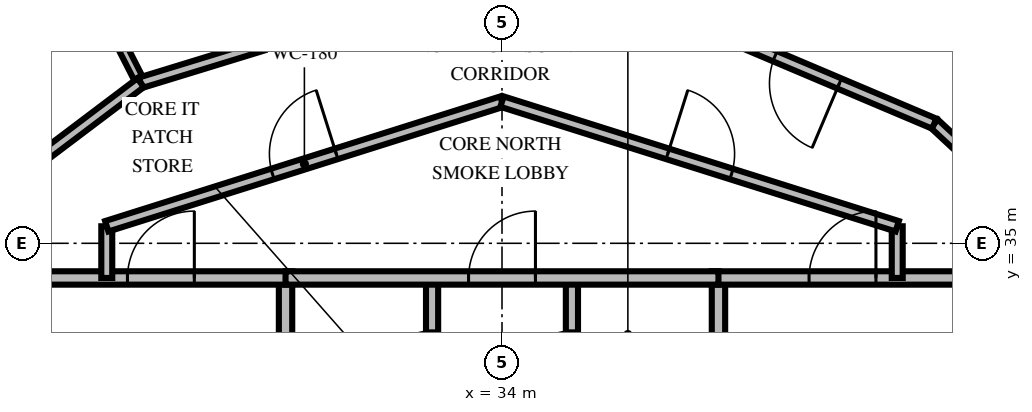
"""IFC4 building model, lengths in metres.
Left out: names, types, materials, properties, quantities, classifications, styles, units other than length and angle.
Written with IfcOpenShell. Run it as: python <this file> out.ifc"""

import sys

from ifc_helpers import new_model, si_unit, direction, frame, frame_2d, origin, place, context, subcontext, project, spatial, rectangle, extrude, element, fill, save


model = new_model("IFC4")
c1 = context("Model", 3, precision=1e-05, world=origin(), true_north=direction((0.0, 1.0)))
c2 = subcontext(c1, "Body", "Model", "MODEL_VIEW")
j1 = project(units=[si_unit("LENGTHUNIT", "METRE"), si_unit("PLANEANGLEUNIT", "RADIAN")], contexts=[c1])
p1 = place(None, origin())
s1 = spatial("IfcSite", under=j1, at=p1, CompositionType="ELEMENT")
p2 = place(p1, origin())
s2 = spatial("IfcBuilding", under=s1, at=p2, CompositionType="ELEMENT")
p3 = place(p2, frame((0.0, 0.0, 188.0)))
s3 = spatial("IfcBuildingStorey", under=s2, at=p3, CompositionType="ELEMENT", Elevation=188.0)
p4 = place(p3, frame((26.622, 42.517, 0.0), z_axis=(0.0, 0.0, 1.0), x_axis=(-0.798099744175, -0.602525350793, 0.0)))
e1 = element("IfcWall", 1, at=p4, inside=s3, PredefinedType="SOLIDWALL", context=c2, shape_type="SweptSolid", body=[
    extrude(rectangle(XDim=8.127, YDim=0.3, at=frame_2d((4.063, 0.0))), origin(), (0.0, 0.0, 1.0), 2.66),
])
p5 = place(p4, frame((6.03, 0.0, 0.0)))
e2 = element("IfcOpeningElement", 2, at=p5, cuts=e1, PredefinedType="OPENING", context=c2, shape_type="SweptSolid", body=[
    extrude(rectangle(XDim=1.05, YDim=2.15, at=frame_2d((0.525, 1.075))), frame((0.0, 0.16, 0.0), z_axis=(0.0, -1.0, 0.0), x_axis=(1.0, 0.0, 0.0)), (0.0, 0.0, 1.0), 0.32),
])
p6 = place(p3, frame((30.44, 30.05, 0.0), z_axis=(0.0, 0.0, 1.0), x_axis=(0.0, 1.0, 0.0)))
e3 = element("IfcWall", 3, at=p6, inside=s3, PredefinedType="SOLIDWALL", context=c2, shape_type="SweptSolid", body=[
    extrude(rectangle(XDim=4.38, YDim=0.22, at=frame_2d((2.19, 0.0))), origin(), (0.0, 0.0, 1.0), 2.46),
])
p7 = place(p6, frame((0.8, 0.0, 0.0)))
e4 = element("IfcOpeningElement", 4, at=p7, cuts=e3, PredefinedType="OPENING", context=c2, shape_type="SweptSolid", body=[
    extrude(rectangle(XDim=1.05, YDim=2.1, at=frame_2d((0.525, 1.05))), frame((0.0, 0.12, 0.0), z_axis=(0.0, -1.0, 0.0), x_axis=(1.0, 0.0, 0.0)), (0.0, 0.0, 1.0), 0.24),
])
p8 = place(p3, frame((26.24, 34.43, 0.0), z_axis=(0.0, 0.0, 1.0), x_axis=(1.0, 0.0, 0.0)))
e5 = element("IfcWall", 5, at=p8, inside=s3, PredefinedType="SOLIDWALL", context=c2, shape_type="SweptSolid", body=[
    extrude(rectangle(XDim=4.31, YDim=0.22, at=frame_2d((2.155, 0.0))), origin(), (0.0, 0.0, 1.0), 2.46),
])
p9 = place(p8, frame((1.6, 0.0, 0.0)))
e6 = element("IfcOpeningElement", 6, at=p9, cuts=e5, PredefinedType="OPENING", context=c2, shape_type="SweptSolid", body=[
    extrude(rectangle(XDim=1.1, YDim=2.15, at=frame_2d((0.55, 1.075))), frame((0.0, 0.12, 0.0), z_axis=(0.0, -1.0, 0.0), x_axis=(1.0, 0.0, 0.0)), (0.0, 0.0, 1.0), 0.24),
])
p10 = place(p3, frame((32.85, 30.05, 0.0), z_axis=(0.0, 0.0, 1.0), x_axis=(0.0, 1.0, 0.0)))
e7 = element("IfcWall", 7, at=p10, inside=s3, PredefinedType="SOLIDWALL", context=c2, shape_type="SweptSolid", body=[
    extrude(rectangle(XDim=4.38, YDim=0.2, at=frame_2d((2.19, 0.0))), origin(), (0.0, 0.0, 1.0), 2.46),
])
p11 = place(p10, frame((2.65, 0.0, 0.0)))
e8 = element("IfcOpeningElement", 8, at=p11, cuts=e7, PredefinedType="OPENING", context=c2, shape_type="SweptSolid", body=[
    extrude(rectangle(XDim=0.86, YDim=2.05, at=frame_2d((0.43, 1.025))), frame((0.0, 0.11, 0.0), z_axis=(0.0, -1.0, 0.0), x_axis=(1.0, 0.0, 0.0)), (0.0, 0.0, 1.0), 0.22),
])
p12 = place(p3, frame((37.56, 30.05, 0.0), z_axis=(0.0, 0.0, 1.0), x_axis=(0.0, 1.0, 0.0)))
e9 = element("IfcWall", 9, at=p12, inside=s3, PredefinedType="SOLIDWALL", context=c2, shape_type="SweptSolid", body=[
    extrude(rectangle(XDim=4.38, YDim=0.22, at=frame_2d((2.19, 0.0))), origin(), (0.0, 0.0, 1.0), 2.46),
])
p13 = place(p12, frame((0.8, 0.0, 0.0)))
e10 = element("IfcOpeningElement", 10, at=p13, cuts=e9, PredefinedType="OPENING", context=c2, shape_type="SweptSolid", body=[
    extrude(rectangle(XDim=1.05, YDim=2.1, at=frame_2d((0.525, 1.05))), frame((0.0, 0.12, 0.0), z_axis=(0.0, -1.0, 0.0), x_axis=(1.0, 0.0, 0.0)), (0.0, 0.0, 1.0), 0.24),
])
p14 = place(p3, frame((37.45, 34.43, 0.0), z_axis=(0.0, 0.0, 1.0), x_axis=(1.0, 0.0, 0.0)))
e11 = element("IfcWall", 11, at=p14, inside=s3, PredefinedType="SOLIDWALL", context=c2, shape_type="SweptSolid", body=[
    extrude(rectangle(XDim=4.31, YDim=0.22, at=frame_2d((2.155, 0.0))), origin(), (0.0, 0.0, 1.0), 2.46),
])
p15 = place(p14, frame((1.6, 0.0, 0.0)))
e12 = element("IfcOpeningElement", 12, at=p15, cuts=e11, PredefinedType="OPENING", context=c2, shape_type="SweptSolid", body=[
    extrude(rectangle(XDim=1.1, YDim=2.15, at=frame_2d((0.55, 1.075))), frame((0.0, 0.12, 0.0), z_axis=(0.0, -1.0, 0.0), x_axis=(1.0, 0.0, 0.0)), (0.0, 0.0, 1.0), 0.24),
])
p16 = place(p3, frame((35.15, 30.05, 0.0), z_axis=(0.0, 0.0, 1.0), x_axis=(0.0, 1.0, 0.0)))
e13 = element("IfcWall", 13, at=p16, inside=s3, PredefinedType="SOLIDWALL", context=c2, shape_type="SweptSolid", body=[
    extrude(rectangle(XDim=4.38, YDim=0.2, at=frame_2d((2.19, 0.0))), origin(), (0.0, 0.0, 1.0), 2.46),
])
p17 = place(p16, frame((2.65, 0.0, 0.0)))
e14 = element("IfcOpeningElement", 14, at=p17, cuts=e13, PredefinedType="OPENING", context=c2, shape_type="SweptSolid", body=[
    extrude(rectangle(XDim=0.86, YDim=2.05, at=frame_2d((0.43, 1.025))), frame((0.0, 0.11, 0.0), z_axis=(0.0, -1.0, 0.0), x_axis=(1.0, 0.0, 0.0)), (0.0, 0.0, 1.0), 0.22),
])
p18 = place(p3, frame((30.44, 34.43, 0.0), z_axis=(0.0, 0.0, 1.0), x_axis=(1.0, 0.0, 0.0)))
e15 = element("IfcWall", 15, at=p18, inside=s3, PredefinedType="SOLIDWALL", context=c2, shape_type="SweptSolid", body=[
    extrude(rectangle(XDim=7.12, YDim=0.22, at=frame_2d((3.56, 0.0))), origin(), (0.0, 0.0, 1.0), 2.46),
])
p19 = place(p18, frame((3.01, 0.0, 0.0)))
e16 = element("IfcOpeningElement", 16, at=p19, cuts=e15, PredefinedType="OPENING", context=c2, shape_type="SweptSolid", body=[
    extrude(rectangle(XDim=1.1, YDim=2.15, at=frame_2d((0.55, 1.075))), frame((0.0, 0.12, 0.0), z_axis=(0.0, -1.0, 0.0), x_axis=(1.0, 0.0, 0.0)), (0.0, 0.0, 1.0), 0.24),
])
for number, where, z_axis, x_axis in (
    (17, (27.5, 34.43, 0.0), (0.0, 0.0, 1.0), (0.0, 1.0, 0.0)),
    (18, (40.5, 35.28, 0.0), (0.0, 0.0, 1.0), (0.0, -1.0, 0.0)),
):
    element("IfcWall", number, at=place(p3, frame(where, z_axis=z_axis, x_axis=x_axis)), inside=s3, PredefinedType="PARTITIONING", context=c2, shape_type="SweptSolid", body=[
        extrude(rectangle(XDim=0.85, YDim=0.18, at=frame_2d((0.425, 0.0))), origin(), (0.0, 0.0, 1.0), 2.46),
    ])
p20 = place(p3, frame((27.5, 35.28, 0.0), z_axis=(0.0, 0.0, 1.0), x_axis=(0.953691418528, 0.300786765376, 0.0)))
e19 = element("IfcWall", 19, at=p20, inside=s3, PredefinedType="PARTITIONING", context=c2, shape_type="SweptSolid", body=[
    extrude(rectangle(XDim=6.816, YDim=0.18, at=frame_2d((3.408, 0.0))), origin(), (0.0, 0.0, 1.0), 2.46),
])
p21 = place(p20, frame((2.858, 0.0, 0.0)))
e20 = element("IfcOpeningElement", 20, at=p21, cuts=e19, PredefinedType="OPENING", context=c2, shape_type="SweptSolid", body=[
    extrude(rectangle(XDim=1.1, YDim=2.15, at=frame_2d((0.55, 1.075))), frame((0.0, 0.1, 0.0), z_axis=(0.0, -1.0, 0.0), x_axis=(1.0, 0.0, 0.0)), (0.0, 0.0, 1.0), 0.2),
])
p22 = place(p3, frame((34.0, 37.33, 0.0), z_axis=(0.0, 0.0, 1.0), x_axis=(0.953691418528, -0.300786765376, 0.0)))
e21 = element("IfcWall", 21, at=p22, inside=s3, PredefinedType="PARTITIONING", context=c2, shape_type="SweptSolid", body=[
    extrude(rectangle(XDim=6.816, YDim=0.18, at=frame_2d((3.408, 0.0))), origin(), (0.0, 0.0, 1.0), 2.46),
])
p23 = place(p22, frame((2.858, 0.0, 0.0)))
e22 = element("IfcOpeningElement", 22, at=p23, cuts=e21, PredefinedType="OPENING", context=c2, shape_type="SweptSolid", body=[
    extrude(rectangle(XDim=1.1, YDim=2.15, at=frame_2d((0.55, 1.075))), frame((0.0, 0.1, 0.0), z_axis=(0.0, -1.0, 0.0), x_axis=(1.0, 0.0, 0.0)), (0.0, 0.0, 1.0), 0.2),
])
p24 = place(p3, frame((28.056, 37.64, 0.0), z_axis=(0.0, 0.0, 1.0), x_axis=(-0.454764652979, 0.890611649599, 0.0)))
e23 = element("IfcWall", 23, at=p24, inside=s3, PredefinedType="PARTITIONING", context=c2, shape_type="SweptSolid", body=[
    extrude(rectangle(XDim=4.943, YDim=0.15, at=frame_2d((2.471, 0.0))), origin(), (0.0, 0.0, 1.0), 2.46),
])
p25 = place(p3, frame((44.431, 33.875, 0.0), z_axis=(0.0, 0.0, 1.0), x_axis=(-0.731959643507, 0.681347987652, 0.0)))
e24 = element("IfcWall", 24, at=p25, inside=s3, PredefinedType="PARTITIONING", context=c2, shape_type="SweptSolid", body=[
    extrude(rectangle(XDim=4.539, YDim=0.18, at=frame_2d((2.27, 0.0))), origin(), (0.0, 0.0, 1.0), 2.46),
])
p26 = place(p3, frame((41.109, 36.968, 0.0), z_axis=(0.0, 0.0, 1.0), x_axis=(-0.92084175152, 0.389936493109, 0.0)))
e25 = element("IfcWall", 25, at=p26, inside=s3, PredefinedType="PARTITIONING", context=c2, shape_type="SweptSolid", body=[
    extrude(rectangle(XDim=4.539, YDim=0.18, at=frame_2d((2.27, 0.0))), origin(), (0.0, 0.0, 1.0), 2.46),
])
p27 = place(p26, frame((1.695, 0.0, 0.0)))
e26 = element("IfcOpeningElement", 26, at=p27, cuts=e25, PredefinedType="OPENING", context=c2, shape_type="SweptSolid", body=[
    extrude(rectangle(XDim=1.15, YDim=2.15, at=frame_2d((0.575, 1.075))), frame((0.0, 0.1, 0.0), z_axis=(0.0, -1.0, 0.0), x_axis=(1.0, 0.0, 0.0)), (0.0, 0.0, 1.0), 0.2),
])
p28 = place(p3, frame((32.396, 38.971, 0.0), z_axis=(0.0, 0.0, 1.0), x_axis=(-0.956054208196, -0.29318995718, 0.0)))
e27 = element("IfcWall", 27, at=p28, inside=s3, PredefinedType="PARTITIONING", context=c2, shape_type="SweptSolid", body=[
    extrude(rectangle(XDim=4.539, YDim=0.18, at=frame_2d((2.27, 0.0))), origin(), (0.0, 0.0, 1.0), 2.46),
])
p29 = place(p3, frame((28.056, 37.64, 0.0), z_axis=(0.0, 0.0, 1.0), x_axis=(-0.798117902905, -0.602501297146, 0.0)))
e28 = element("IfcWall", 28, at=p29, inside=s3, PredefinedType="PARTITIONING", context=c2, shape_type="SweptSolid", body=[
    extrude(rectangle(XDim=4.539, YDim=0.18, at=frame_2d((2.27, 0.0))), origin(), (0.0, 0.0, 1.0), 2.46),
])
p30 = place(p29, frame((2.579, 0.0, 0.0)))
e29 = element("IfcOpeningElement", 29, at=p30, cuts=e28, PredefinedType="OPENING", context=c2, shape_type="SweptSolid", body=[
    extrude(rectangle(XDim=1.0, YDim=2.15, at=frame_2d((0.5, 1.075))), frame((0.0, 0.1, 0.0), z_axis=(0.0, -1.0, 0.0), x_axis=(1.0, 0.0, 0.0)), (0.0, 0.0, 1.0), 0.2),
])
p31 = place(p3, frame((27.056, 39.6, 0.0), z_axis=(0.0, 0.0, 1.0), x_axis=(-0.798112296688, -0.602508723485, 0.0)))
e30 = element("IfcWall", 30, at=p31, inside=s3, PredefinedType="PARTITIONING", context=c2, shape_type="SweptSolid", body=[
    extrude(rectangle(XDim=5.303, YDim=0.15, at=frame_2d((2.652, 0.0))), origin(), (0.0, 0.0, 1.0), 2.46),
])
p32 = place(p31, frame((3.175, 0.0, 0.0)))
e31 = element("IfcOpeningElement", 31, at=p32, cuts=e30, PredefinedType="OPENING", context=c2, shape_type="SweptSolid", body=[
    extrude(rectangle(XDim=0.95, YDim=2.15, at=frame_2d((0.475, 1.075))), frame((0.0, 0.085, 0.0), z_axis=(0.0, -1.0, 0.0), x_axis=(1.0, 0.0, 0.0)), (0.0, 0.0, 1.0), 0.17),
])
p33 = place(p9, origin())
e32 = element("IfcDoor", 32, at=p33, inside=s3, OperationType="SINGLE_SWING_RIGHT", PredefinedType="DOOR", context=c2, shape_type="SweptSolid", body=[
    extrude(rectangle(XDim=1.1, YDim=2.15, at=frame_2d((0.55, 1.075))), frame((0.0, 0.025, 0.0), z_axis=(0.0, -1.0, 0.0), x_axis=(1.0, 0.0, 0.0)), (0.0, 0.0, 1.0), 0.05),
])
fill(e6, e32)
p34 = place(p11, origin())
e33 = element("IfcDoor", 33, at=p34, inside=s3, OperationType="SINGLE_SWING_LEFT", PredefinedType="TRAPDOOR", context=c2, shape_type="SweptSolid", body=[
    extrude(rectangle(XDim=0.86, YDim=2.05, at=frame_2d((0.43, 1.025))), frame((0.0, 0.025, 0.0), z_axis=(0.0, -1.0, 0.0), x_axis=(1.0, 0.0, 0.0)), (0.0, 0.0, 1.0), 0.05),
])
fill(e8, e33)
p35 = place(p15, origin())
e34 = element("IfcDoor", 34, at=p35, inside=s3, OperationType="SINGLE_SWING_RIGHT", PredefinedType="DOOR", context=c2, shape_type="SweptSolid", body=[
    extrude(rectangle(XDim=1.1, YDim=2.15, at=frame_2d((0.55, 1.075))), frame((0.0, 0.025, 0.0), z_axis=(0.0, -1.0, 0.0), x_axis=(1.0, 0.0, 0.0)), (0.0, 0.0, 1.0), 0.05),
])
fill(e12, e34)
p36 = place(p17, origin())
e35 = element("IfcDoor", 35, at=p36, inside=s3, OperationType="SINGLE_SWING_LEFT", PredefinedType="TRAPDOOR", context=c2, shape_type="SweptSolid", body=[
    extrude(rectangle(XDim=0.86, YDim=2.05, at=frame_2d((0.43, 1.025))), frame((0.0, 0.025, 0.0), z_axis=(0.0, -1.0, 0.0), x_axis=(1.0, 0.0, 0.0)), (0.0, 0.0, 1.0), 0.05),
])
fill(e14, e35)
p37 = place(p19, origin())
e36 = element("IfcDoor", 36, at=p37, inside=s3, OperationType="SINGLE_SWING_RIGHT", PredefinedType="DOOR", context=c2, shape_type="SweptSolid", body=[
    extrude(rectangle(XDim=1.1, YDim=2.15, at=frame_2d((0.55, 1.075))), frame((0.0, 0.025, 0.0), z_axis=(0.0, -1.0, 0.0), x_axis=(1.0, 0.0, 0.0)), (0.0, 0.0, 1.0), 0.05),
])
fill(e16, e36)
p38 = place(p21, origin())
e37 = element("IfcDoor", 37, at=p38, inside=s3, OperationType="SINGLE_SWING_RIGHT", PredefinedType="DOOR", context=c2, shape_type="SweptSolid", body=[
    extrude(rectangle(XDim=1.1, YDim=2.15, at=frame_2d((0.55, 1.075))), frame((0.0, 0.025, 0.0), z_axis=(0.0, -1.0, 0.0), x_axis=(1.0, 0.0, 0.0)), (0.0, 0.0, 1.0), 0.05),
])
fill(e20, e37)
p39 = place(p23, origin())
e38 = element("IfcDoor", 38, at=p39, inside=s3, OperationType="SINGLE_SWING_LEFT", PredefinedType="DOOR", context=c2, shape_type="SweptSolid", body=[
    extrude(rectangle(XDim=1.1, YDim=2.15, at=frame_2d((0.55, 1.075))), frame((0.0, 0.025, 0.0), z_axis=(0.0, -1.0, 0.0), x_axis=(1.0, 0.0, 0.0)), (0.0, 0.0, 1.0), 0.05),
])
fill(e22, e38)
p40 = place(p27, origin())
e39 = element("IfcDoor", 39, at=p40, inside=s3, OperationType="SINGLE_SWING_LEFT", PredefinedType="DOOR", context=c2, shape_type="SweptSolid", body=[
    extrude(rectangle(XDim=1.15, YDim=2.15, at=frame_2d((0.575, 1.075))), frame((0.0, 0.025, 0.0), z_axis=(0.0, -1.0, 0.0), x_axis=(1.0, 0.0, 0.0)), (0.0, 0.0, 1.0), 0.05),
])
fill(e26, e39)
save(model, sys.argv[1])
